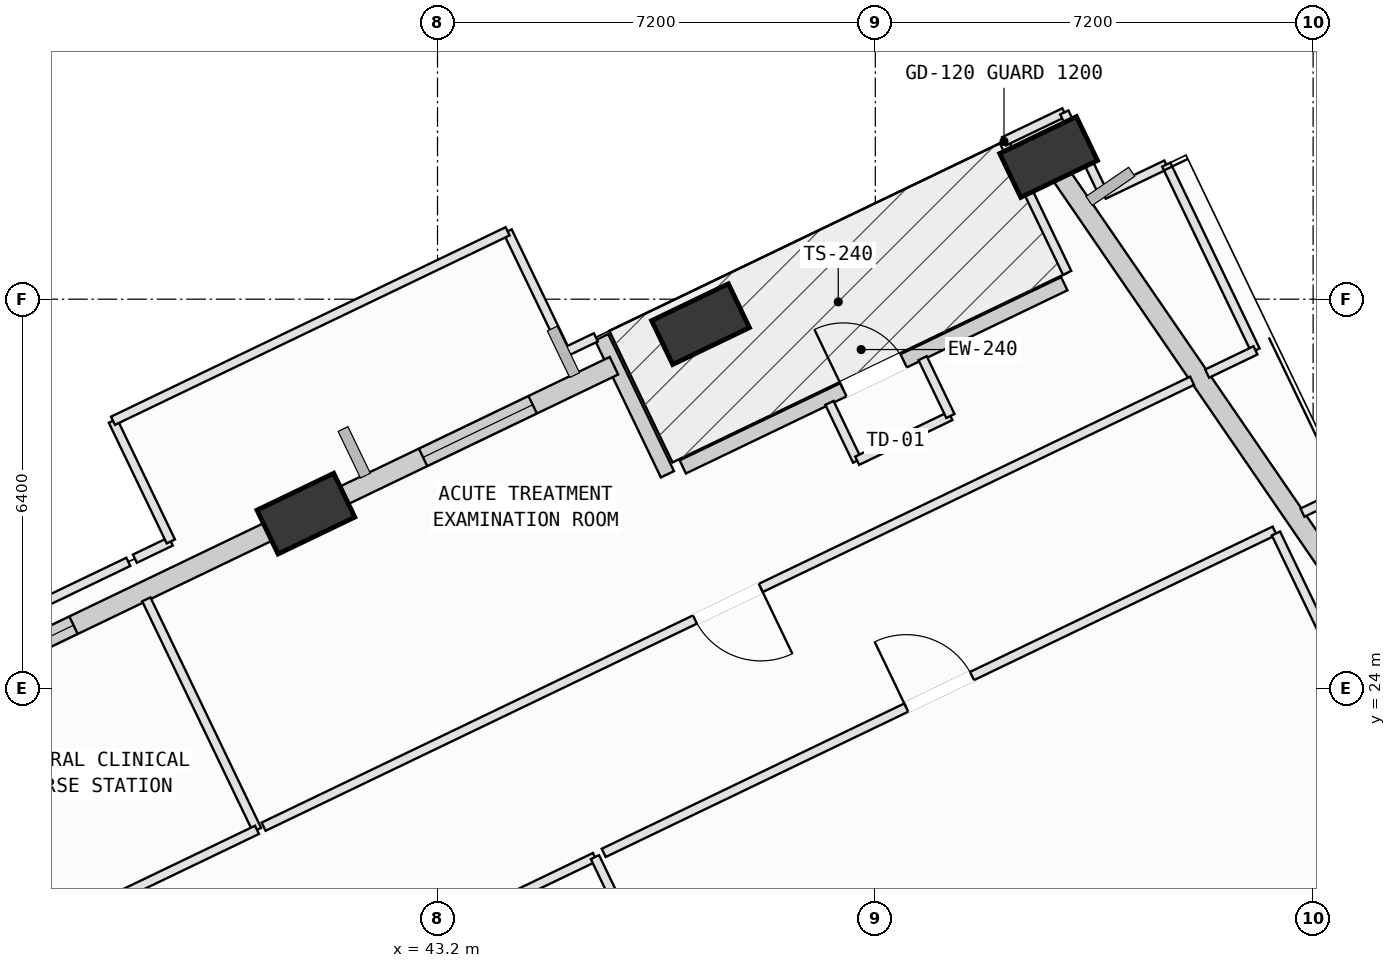
"""IFC4 building model, lengths in metres.
Left out: names, types, materials, properties, quantities, classifications, styles, units other than length and angle.
Written with IfcOpenShell. Run it as: python <this file> out.ifc"""

import sys

from ifc_helpers import new_model, si_unit, direction, frame, frame_2d, origin, origin_2d, place, context, subcontext, project, spatial, rectangle, extrude, element, fill, save


model = new_model("IFC4")
c1 = context("Model", 3, precision=1e-05, world=origin(), true_north=direction((0.0, 1.0)))
c2 = subcontext(c1, "Body", "Model", "MODEL_VIEW")
j1 = project(units=[si_unit("LENGTHUNIT", "METRE"), si_unit("PLANEANGLEUNIT", "RADIAN")], contexts=[c1])
p1 = place(None, origin())
s1 = spatial("IfcSite", under=j1, at=p1, CompositionType="ELEMENT")
p2 = place(p1, origin())
s2 = spatial("IfcBuilding", under=s1, at=p2, CompositionType="ELEMENT")
p3 = place(p2, frame((0.0, 0.0, 132.4)))
s3 = spatial("IfcBuildingStorey", under=s2, at=p3, CompositionType="ELEMENT", Elevation=132.4)
p4 = place(p3, frame((53.25, 32.739, 0.002), z_axis=(-0.033410510138, 0.080818137455, 0.996168743974), x_axis=(-0.668331325161, -0.742899857935, 0.037855526533)))
e1 = element("IfcColumn", 1, at=p4, inside=s3, PredefinedType="COLUMN", context=c2, shape_type="SweptSolid", body=[
    extrude(rectangle(XDim=1.4, YDim=0.8, at=origin_2d()), origin(), (0.0, 0.0, 1.0), 4.012),
])
p5 = place(p3, frame((47.526, 29.99, 0.002), z_axis=(-0.021951173604, 0.057438904263, 0.998107668668), x_axis=(-0.687821910111, -0.725391291577, 0.026617552021)))
e2 = element("IfcColumn", 2, at=p5, inside=s3, PredefinedType="COLUMN", context=c2, shape_type="SweptSolid", body=[
    extrude(rectangle(XDim=1.4, YDim=0.8, at=origin_2d()), origin(), (0.0, 0.0, 1.0), 4.004),
])
p6 = place(p3, frame((41.035, 26.873, 0.002), z_axis=(-0.00885366467, 0.030774117199, 0.99948715166), x_axis=(-0.746694417062, -0.665022783918, 0.013861616019)))
e3 = element("IfcColumn", 3, at=p6, inside=s3, PredefinedType="COLUMN", context=c2, shape_type="SweptSolid", body=[
    extrude(rectangle(XDim=1.4, YDim=0.8, at=origin_2d()), origin(), (0.0, 0.0, 1.0), 3.998),
])
p7 = place(p3, frame((47.233, 27.642, 0.0), z_axis=(0.0, 0.0, 1.0), x_axis=(0.901461742276, 0.432858784376, 0.0)))
e4 = element("IfcWall", 4, at=p7, inside=s3, PredefinedType="SOLIDWALL", context=c2, shape_type="SweptSolid", body=[
    extrude(rectangle(XDim=6.96, YDim=0.24, at=frame_2d((3.48, 0.0))), origin(), (0.0, 0.0, 1.0), 2.945),
])
p8 = place(p7, frame((2.93, 0.0, 0.0)))
e5 = element("IfcOpeningElement", 5, at=p8, cuts=e4, PredefinedType="OPENING", context=c2, shape_type="SweptSolid", body=[
    extrude(rectangle(XDim=1.1, YDim=2.15, at=frame_2d((0.55, 1.075))), frame((0.0, 0.13, 0.0), z_axis=(0.0, -1.0, 0.0), x_axis=(1.0, 0.0, 0.0)), (0.0, 0.0, 1.0), 0.26),
])
p9 = place(p3, frame((45.899, 29.774, 0.0), z_axis=(0.0, 0.0, 1.0), x_axis=(0.432937429984, -0.901423974453, 0.0)))
e6 = element("IfcWall", 6, at=p9, inside=s3, PredefinedType="SOLIDWALL", context=c2, shape_type="SweptSolid", body=[
    extrude(rectangle(XDim=2.5, YDim=0.24, at=frame_2d((1.25, 0.0))), origin(), (0.0, 0.0, 1.0), 3.165),
])
p10 = place(p3, frame((53.433, 32.472, 0.0), z_axis=(0.0, 0.0, 1.0), x_axis=(0.565541240042, -0.824720016619, 0.0)))
e7 = element("IfcWall", 7, at=p10, inside=s3, PredefinedType="SOLIDWALL", context=c2, shape_type="SweptSolid", body=[
    extrude(rectangle(XDim=8.838, YDim=0.32, at=frame_2d((4.419, 0.0))), origin(), (0.0, 0.0, 1.0), 3.165),
])
p11 = place(p3, frame((41.489, 27.091, 0.0), z_axis=(0.0, 0.0, 1.0), x_axis=(0.901450827028, 0.432881515488, 0.0)))
e8 = element("IfcWall", 8, at=p11, inside=s3, PredefinedType="SOLIDWALL", context=c2, shape_type="SweptSolid", body=[
    extrude(rectangle(XDim=5.117, YDim=0.32, at=frame_2d((2.559, 0.0))), origin(), (0.0, 0.0, 1.0), 3.145),
])
p12 = place(p11, frame((1.635, 0.0, 0.75)))
e9 = element("IfcOpeningElement", 9, at=p12, cuts=e8, PredefinedType="OPENING", context=c2, shape_type="SweptSolid", body=[
    extrude(rectangle(XDim=2.0, YDim=1.95, at=frame_2d((1.0, 0.975))), frame((0.0, 0.17, 0.0), z_axis=(0.0, -1.0, 0.0), x_axis=(1.0, 0.0, 0.0)), (0.0, 0.0, 1.0), 0.34),
])
p13 = place(p3, frame((35.002, 23.976, 0.0), z_axis=(0.0, 0.0, 1.0), x_axis=(0.901466619475, 0.432848627089, 0.0)))
e10 = element("IfcWall", 10, at=p13, inside=s3, PredefinedType="SOLIDWALL", context=c2, shape_type="SweptSolid", body=[
    extrude(rectangle(XDim=6.211, YDim=0.32, at=frame_2d((3.105, 0.0))), origin(), (0.0, 0.0, 1.0), 3.165),
])
p14 = place(p13, frame((1.053, 0.0, 0.75)))
e11 = element("IfcOpeningElement", 11, at=p14, cuts=e10, PredefinedType="OPENING", context=c2, shape_type="SweptSolid", body=[
    extrude(rectangle(XDim=1.4, YDim=1.85, at=frame_2d((0.7, 0.925))), frame((0.0, 0.17, 0.0), z_axis=(0.0, -1.0, 0.0), x_axis=(1.0, 0.0, 0.0)), (0.0, 0.0, 1.0), 0.34),
])
p15 = place(p3, frame((36.5, 16.763, 0.0), z_axis=(0.0, 0.0, 1.0), x_axis=(0.901430980475, 0.432922842363, 0.0)))
e12 = element("IfcWall", 12, at=p15, inside=s3, PredefinedType="PARTITIONING", context=c2, shape_type="SweptSolid", body=[
    extrude(rectangle(XDim=10.305, YDim=0.15, at=frame_2d((5.152, 0.0))), origin(), (0.0, 0.0, 1.0), 2.965),
])
p16 = place(p15, frame((4.552, 0.0, 0.0)))
e13 = element("IfcOpeningElement", 13, at=p16, cuts=e12, PredefinedType="OPENING", context=c2, shape_type="SweptSolid", body=[
    extrude(rectangle(XDim=1.2, YDim=2.15, at=frame_2d((0.6, 1.075))), frame((0.0, 0.085, 0.0), z_axis=(0.0, -1.0, 0.0), x_axis=(1.0, 0.0, 0.0)), (0.0, 0.0, 1.0), 0.17),
])
p17 = place(p3, frame((45.789, 21.224, 0.0), z_axis=(0.0, 0.0, 1.0), x_axis=(0.43290477925, -0.901439655275, 0.0)))
e14 = element("IfcWall", 14, at=p17, inside=s3, PredefinedType="PARTITIONING", context=c2, shape_type="SweptSolid", body=[
    extrude(rectangle(XDim=13.615, YDim=0.15, at=frame_2d((6.808, 0.0))), origin(), (0.0, 0.0, 1.0), 3.78),
])
p18 = place(p3, frame((45.933, 21.293, 0.0), z_axis=(0.0, 0.0, 1.0), x_axis=(0.901434334473, 0.432915858607, 0.0)))
e15 = element("IfcWall", 15, at=p18, inside=s3, PredefinedType="PARTITIONING", context=c2, shape_type="SweptSolid", body=[
    extrude(rectangle(XDim=12.24, YDim=0.15, at=frame_2d((6.12, 0.0))), origin(), (0.0, 0.0, 1.0), 3.78),
])
p19 = place(p18, frame((5.52, 0.0, 0.0)))
e16 = element("IfcOpeningElement", 16, at=p19, cuts=e15, PredefinedType="OPENING", context=c2, shape_type="SweptSolid", body=[
    extrude(rectangle(XDim=1.2, YDim=2.15, at=frame_2d((0.6, 1.075))), frame((0.0, 0.085, 0.0), z_axis=(0.0, -1.0, 0.0), x_axis=(1.0, 0.0, 0.0)), (0.0, 0.0, 1.0), 0.17),
])
p20 = place(p3, frame((56.989, 26.547, 0.0), z_axis=(0.0, 0.0, 1.0), x_axis=(0.432826288484, -0.901477345249, 0.0)))
e17 = element("IfcWall", 17, at=p20, inside=s3, PredefinedType="PARTITIONING", context=c2, shape_type="SweptSolid", body=[
    extrude(rectangle(XDim=10.836, YDim=0.15, at=frame_2d((5.418, 0.0))), origin(), (0.0, 0.0, 1.0), 3.78),
])
p21 = place(p3, frame((28.538, 21.482, 0.0), z_axis=(0.0, 0.0, 1.0), x_axis=(0.901477867435, 0.432825200889, 0.0)))
e18 = element("IfcWall", 18, at=p21, inside=s3, PredefinedType="PARTITIONING", context=c2, shape_type="SweptSolid", body=[
    extrude(rectangle(XDim=10.624, YDim=0.15, at=frame_2d((5.312, 0.0))), origin(), (0.0, 0.0, 1.0), 3.78),
])
p22 = place(p3, frame((38.411, 25.463, 0.0), z_axis=(0.0, 0.0, 1.0), x_axis=(0.432827326229, -0.901476846996, 0.0)))
e19 = element("IfcWall", 19, at=p22, inside=s3, PredefinedType="PARTITIONING", context=c2, shape_type="SweptSolid", body=[
    extrude(rectangle(XDim=4.205, YDim=0.15, at=frame_2d((2.103, 0.0))), origin(), (0.0, 0.0, 1.0), 3.78),
])
p23 = place(p3, frame((40.231, 21.672, 0.0), z_axis=(0.0, 0.0, 1.0), x_axis=(-0.901436954351, -0.432910403351, 0.0)))
e20 = element("IfcWall", 20, at=p23, inside=s3, PredefinedType="PARTITIONING", context=c2, shape_type="SweptSolid", body=[
    extrude(rectangle(XDim=2.522, YDim=0.15, at=frame_2d((1.261, 0.0))), origin(), (0.0, 0.0, 1.0), 2.945),
])
p24 = place(p3, frame((44.352, 31.516, 0.0), z_axis=(0.0, 0.0, 1.0), x_axis=(0.433088163872, -0.901351564216, 0.0)))
e21 = element("IfcWall", 21, at=p24, inside=s3, PredefinedType="PARTITIONING", context=c2, shape_type="SweptSolid", body=[
    extrude(rectangle(XDim=2.2, YDim=0.15, at=frame_2d((1.1, 0.0))), origin(), (0.0, 0.0, 1.0), 3.78),
])
p25 = place(p3, frame((45.305, 29.533, 0.0), z_axis=(0.0, 0.0, 1.0), x_axis=(0.901887660822, 0.43197065555, 0.0)))
e22 = element("IfcWall", 22, at=p25, inside=s3, PredefinedType="PARTITIONING", context=c2, shape_type="SweptSolid", body=[
    extrude(rectangle(XDim=0.553, YDim=0.15, at=frame_2d((0.277, 0.0))), origin(), (0.0, 0.0, 1.0), 3.145),
])
p26 = place(p3, frame((49.646, 28.694, 0.0), z_axis=(0.0, 0.0, 1.0), x_axis=(0.432339766945, -0.901710777311, 0.0)))
e23 = element("IfcWall", 23, at=p26, inside=s3, PredefinedType="PARTITIONING", context=c2, shape_type="SweptSolid", body=[
    extrude(rectangle(XDim=1.055, YDim=0.15, at=frame_2d((0.527, 0.0))), origin(), (0.0, 0.0, 1.0), 3.78),
])
p27 = place(p3, frame((50.102, 27.743, 0.0), z_axis=(0.0, 0.0, 1.0), x_axis=(0.901462559733, 0.432857081955, 0.0)))
e24 = element("IfcWall", 24, at=p27, inside=s3, PredefinedType="PARTITIONING", context=c2, shape_type="SweptSolid", body=[
    extrude(rectangle(XDim=1.7, YDim=0.15, at=frame_2d((0.85, 0.0))), origin(), (0.0, 0.0, 1.0), 3.78),
])
p28 = place(p3, frame((51.635, 28.479, 0.0), z_axis=(0.0, 0.0, 1.0), x_axis=(-0.433182380404, 0.901306288288, 0.0)))
e25 = element("IfcWall", 25, at=p28, inside=s3, PredefinedType="PARTITIONING", context=c2, shape_type="SweptSolid", body=[
    extrude(rectangle(XDim=1.055, YDim=0.15, at=frame_2d((0.528, 0.0))), origin(), (0.0, 0.0, 1.0), 3.78),
])
p29 = place(p3, frame((53.555, 30.833, 0.0), z_axis=(0.0, 0.0, 1.0), x_axis=(-0.432912977498, 0.901435718126, 0.0)))
e26 = element("IfcWall", 26, at=p29, inside=s3, PredefinedType="PARTITIONING", context=c2, shape_type="SweptSolid", body=[
    extrude(rectangle(XDim=2.4, YDim=0.15, at=frame_2d((1.2, 0.0))), origin(), (0.0, 0.0, 1.0), 3.78),
])
p30 = place(p3, frame((52.516, 32.996, 0.0), z_axis=(0.0, 0.0, 1.0), x_axis=(0.901630378805, 0.43250741036, 0.0)))
e27 = element("IfcWall", 27, at=p30, inside=s3, PredefinedType="PARTITIONING", context=c2, shape_type="SweptSolid", body=[
    extrude(rectangle(XDim=1.1, YDim=0.15, at=frame_2d((0.55, 0.0))), origin(), (0.0, 0.0, 1.0), 2.945),
])
p31 = place(p3, frame((53.508, 33.472, 0.0), z_axis=(0.0, 0.0, 1.0), x_axis=(0.43276282581, -0.901507812832, 0.0)))
e28 = element("IfcWall", 28, at=p31, inside=s3, PredefinedType="PARTITIONING", context=c2, shape_type="SweptSolid", body=[
    extrude(rectangle(XDim=1.5, YDim=0.15, at=frame_2d((0.75, 0.0))), origin(), (0.0, 0.0, 1.0), 3.165),
])
p32 = place(p3, frame((54.157, 32.12, 0.0), z_axis=(0.0, 0.0, 1.0), x_axis=(0.901713434214, 0.432334225523, 0.0)))
e29 = element("IfcWall", 29, at=p32, inside=s3, PredefinedType="PARTITIONING", context=c2, shape_type="SweptSolid", body=[
    extrude(rectangle(XDim=1.14, YDim=0.15, at=frame_2d((0.57, 0.0))), origin(), (0.0, 0.0, 1.0), 3.78),
])
p33 = place(p3, frame((55.185, 32.613, 0.0), z_axis=(0.0, 0.0, 1.0), x_axis=(0.432892660417, -0.901445475088, 0.0)))
e30 = element("IfcWall", 30, at=p33, inside=s3, PredefinedType="PARTITIONING", context=c2, shape_type="SweptSolid", body=[
    extrude(rectangle(XDim=3.389, YDim=0.15, at=frame_2d((1.694, 0.0))), origin(), (0.0, 0.0, 1.0), 3.78),
])
p34 = place(p3, frame((56.652, 29.558, 0.0), z_axis=(0.0, 0.0, 1.0), x_axis=(-0.901345925248, -0.433099899605, 0.0)))
e31 = element("IfcWall", 31, at=p34, inside=s3, PredefinedType="PARTITIONING", context=c2, shape_type="SweptSolid", body=[
    extrude(rectangle(XDim=0.882, YDim=0.15, at=frame_2d((0.441, 0.0))), origin(), (0.0, 0.0, 1.0), 3.78),
])
p35 = place(p3, frame((55.61, 29.058, 0.0), z_axis=(0.0, 0.0, 1.0), x_axis=(-0.901422279178, -0.432940959718, 0.0)))
e32 = element("IfcWall", 32, at=p35, inside=s3, PredefinedType="PARTITIONING", context=c2, shape_type="SweptSolid", body=[
    extrude(rectangle(XDim=16.94, YDim=0.15, at=frame_2d((8.47, 0.0))), origin(), (0.0, 0.0, 1.0), 2.945),
])
p36 = place(p35, frame((7.87, 0.0, 0.0)))
e33 = element("IfcOpeningElement", 33, at=p36, cuts=e32, PredefinedType="OPENING", context=c2, shape_type="SweptSolid", body=[
    extrude(rectangle(XDim=1.2, YDim=2.15, at=frame_2d((0.6, 1.075))), frame((0.0, 0.085, 0.0), z_axis=(0.0, -1.0, 0.0), x_axis=(1.0, 0.0, 0.0)), (0.0, 0.0, 1.0), 0.17),
])
p37 = place(p3, frame((38.223, 26.132, 0.0), z_axis=(0.0, 0.0, 1.0), x_axis=(0.901389385584, 0.433009440493, 0.0)))
e34 = element("IfcWall", 34, at=p37, inside=s3, PredefinedType="PARTITIONING", context=c2, shape_type="SweptSolid", body=[
    extrude(rectangle(XDim=0.656, YDim=0.15, at=frame_2d((0.328, 0.0))), origin(), (0.0, 0.0, 1.0), 3.78),
])
p38 = place(p3, frame((38.814, 26.416, 0.0), z_axis=(0.0, 0.0, 1.0), x_axis=(-0.432597604334, 0.901587107674, 0.0)))
e35 = element("IfcWall", 35, at=p38, inside=s3, PredefinedType="PARTITIONING", context=c2, shape_type="SweptSolid", body=[
    extrude(rectangle(XDim=2.2, YDim=0.15, at=frame_2d((1.1, 0.0))), origin(), (0.0, 0.0, 1.0), 3.78),
])
p39 = place(p3, frame((37.862, 28.4, 0.0), z_axis=(0.0, 0.0, 1.0), x_axis=(0.901468015734, 0.432845719175, 0.0)))
e36 = element("IfcWall", 36, at=p39, inside=s3, PredefinedType="PARTITIONING", context=c2, shape_type="SweptSolid", body=[
    extrude(rectangle(XDim=7.199, YDim=0.15, at=frame_2d((3.6, 0.0))), origin(), (0.0, 0.0, 1.0), 3.78),
])
p40 = place(p3, frame((57.425, 26.889, 0.0), z_axis=(0.0, 0.0, 1.0), x_axis=(0.901644033321, 0.4324789442, 0.0)))
e37 = element("IfcWall", 37, at=p40, inside=s3, PredefinedType="PARTITIONING", context=c2, shape_type="SweptSolid", body=[
    extrude(rectangle(XDim=0.819, YDim=0.15, at=frame_2d((0.409, 0.0))), origin(), (0.0, 0.0, 1.0), 3.78),
])
p41 = place(p8, origin())
e38 = element("IfcDoor", 38, at=p41, inside=s3, OperationType="SINGLE_SWING_LEFT", PredefinedType="DOOR", context=c2, shape_type="SweptSolid", body=[
    extrude(rectangle(XDim=1.1, YDim=2.15, at=frame_2d((0.55, 1.075))), frame((0.0, 0.025, 0.0), z_axis=(0.0, -1.0, 0.0), x_axis=(1.0, 0.0, 0.0)), (0.0, 0.0, 1.0), 0.05),
])
fill(e5, e38)
p42 = place(p12, origin())
e39 = element("IfcWindow", 39, at=p42, inside=s3, PartitioningType="SINGLE_PANEL", PredefinedType="WINDOW", context=c2, shape_type="SweptSolid", body=[
    extrude(rectangle(XDim=2.0, YDim=1.95, at=frame_2d((1.0, 0.975))), frame((0.0, 0.03, 0.0), z_axis=(0.0, -1.0, 0.0), x_axis=(1.0, 0.0, 0.0)), (0.0, 0.0, 1.0), 0.06),
])
fill(e9, e39)
p43 = place(p14, origin())
e40 = element("IfcWindow", 40, at=p43, inside=s3, PartitioningType="SINGLE_PANEL", PredefinedType="WINDOW", context=c2, shape_type="SweptSolid", body=[
    extrude(rectangle(XDim=1.4, YDim=1.85, at=frame_2d((0.7, 0.925))), frame((0.0, 0.03, 0.0), z_axis=(0.0, -1.0, 0.0), x_axis=(1.0, 0.0, 0.0)), (0.0, 0.0, 1.0), 0.06),
])
fill(e11, e40)
p44 = place(p19, origin())
e41 = element("IfcDoor", 41, at=p44, inside=s3, OperationType="SINGLE_SWING_LEFT", PredefinedType="DOOR", context=c2, shape_type="SweptSolid", body=[
    extrude(rectangle(XDim=1.2, YDim=2.15, at=frame_2d((0.6, 1.075))), frame((0.0, 0.025, 0.0), z_axis=(0.0, -1.0, 0.0), x_axis=(1.0, 0.0, 0.0)), (0.0, 0.0, 1.0), 0.05),
])
fill(e16, e41)
p45 = place(p36, origin())
e42 = element("IfcDoor", 42, at=p45, inside=s3, OperationType="SINGLE_SWING_LEFT", PredefinedType="DOOR", context=c2, shape_type="SweptSolid", body=[
    extrude(rectangle(XDim=1.2, YDim=2.15, at=frame_2d((0.6, 1.075))), frame((0.0, 0.025, 0.0), z_axis=(0.0, -1.0, 0.0), x_axis=(1.0, 0.0, 0.0)), (0.0, 0.0, 1.0), 0.05),
])
fill(e33, e42)
save(model, sys.argv[1])
